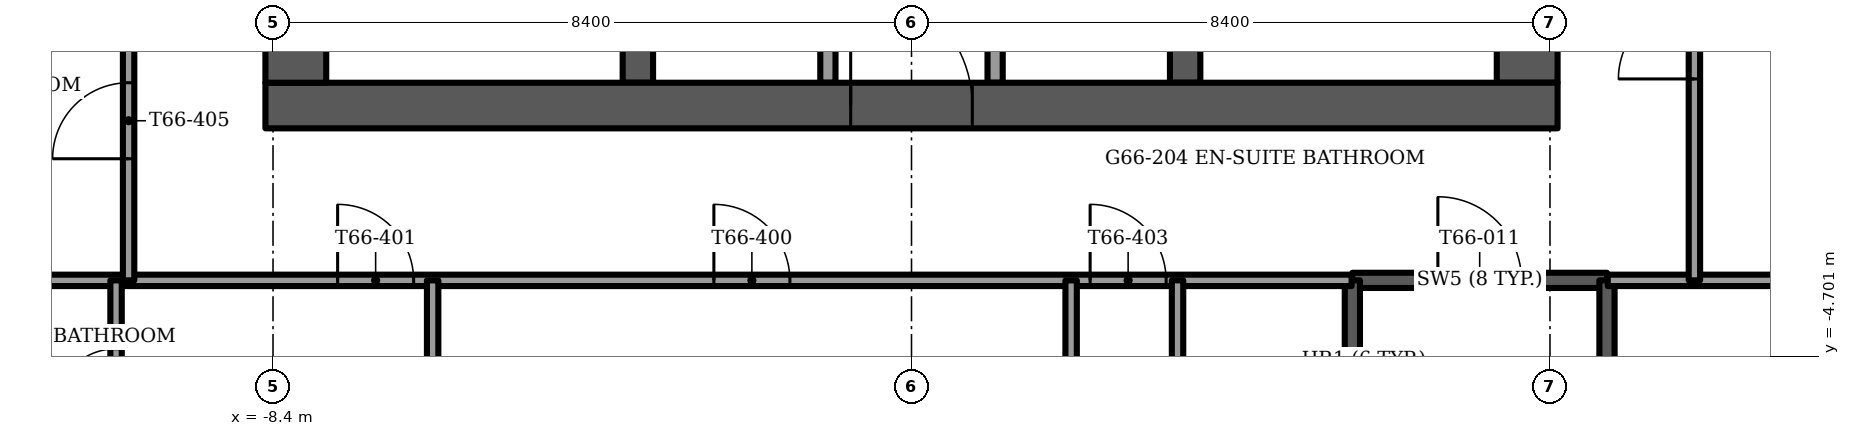
"""IFC4 building model, lengths in metres.
Left out: names, types, materials, properties, quantities, classifications, styles, units other than length and angle.
Written with IfcOpenShell. Run it as: python <this file> out.ifc"""

import sys

from ifc_helpers import new_model, si_unit, direction, frame, frame_2d, origin, place, context, subcontext, project, spatial, rectangle, extrude, element, fill, save


model = new_model("IFC4")
c1 = context("Model", 3, precision=1e-05, world=origin(), true_north=direction((0.0, 1.0)))
c2 = subcontext(c1, "Body", "Model", "MODEL_VIEW")
j1 = project(units=[si_unit("LENGTHUNIT", "METRE"), si_unit("PLANEANGLEUNIT", "RADIAN")], contexts=[c1])
p1 = place(None, origin())
s1 = spatial("IfcSite", under=j1, at=p1, CompositionType="ELEMENT")
p2 = place(p1, origin())
s2 = spatial("IfcBuilding", under=s1, at=p2, CompositionType="ELEMENT")
p3 = place(p2, frame((0.0, 0.0, 267.5)))
s3 = spatial("IfcBuildingStorey", under=s2, at=p3, CompositionType="ELEMENT", Elevation=267.5)
p4 = place(p3, frame((-8.5, -1.4, -0.3), z_axis=(0.0, 0.0, 1.0), x_axis=(1.0, 0.0, 0.0)))
e1 = element("IfcWall", 1, at=p4, inside=s3, PredefinedType="SHEAR", context=c2, shape_type="SweptSolid", body=[
    extrude(rectangle(XDim=17.0, YDim=0.6, at=frame_2d((8.5, 0.0))), origin(), (0.0, 0.0, 1.0), 3.75),
])
p5 = place(p4, frame((7.7, 0.0, 0.0)))
e2 = element("IfcOpeningElement", 2, at=p5, cuts=e1, PredefinedType="OPENING", context=c2, shape_type="SweptSolid", body=[
    extrude(rectangle(XDim=1.6, YDim=2.1, at=frame_2d((0.8, 1.05))), frame((0.0, 0.3, 0.0), z_axis=(0.0, -1.0, 0.0), x_axis=(1.0, 0.0, 0.0)), (0.0, 0.0, 1.0), 0.6),
])
p6 = place(p3, frame((-8.1, -1.1, -0.3), z_axis=(0.0, 0.0, 1.0), x_axis=(0.0, 1.0, 0.0)))
e3 = element("IfcWall", 3, at=p6, inside=s3, PredefinedType="SHEAR", context=c2, shape_type="SweptSolid", body=[
    extrude(rectangle(XDim=10.2, YDim=0.8, at=frame_2d((5.1, 0.0))), origin(), (0.0, 0.0, 1.0), 3.75),
])
p7 = place(p6, frame((8.35, 0.0, 0.0)))
e4 = element("IfcOpeningElement", 4, at=p7, cuts=e3, PredefinedType="OPENING", context=c2, shape_type="SweptSolid", body=[
    extrude(rectangle(XDim=1.1, YDim=2.1, at=frame_2d((0.55, 1.05))), frame((0.0, 0.4, 0.0), z_axis=(0.0, -1.0, 0.0), x_axis=(1.0, 0.0, 0.0)), (0.0, 0.0, 1.0), 0.8),
])
p8 = place(p3, frame((8.1, -1.1, -0.3), z_axis=(0.0, 0.0, 1.0), x_axis=(0.0, 1.0, 0.0)))
e5 = element("IfcWall", 5, at=p8, inside=s3, PredefinedType="SHEAR", context=c2, shape_type="SweptSolid", body=[
    extrude(rectangle(XDim=10.2, YDim=0.8, at=frame_2d((5.1, 0.0))), origin(), (0.0, 0.0, 1.0), 3.75),
])
p9 = place(p8, frame((8.35, 0.0, 0.0)))
e6 = element("IfcOpeningElement", 6, at=p9, cuts=e5, PredefinedType="OPENING", context=c2, shape_type="SweptSolid", body=[
    extrude(rectangle(XDim=1.1, YDim=2.1, at=frame_2d((0.55, 1.05))), frame((0.0, 0.4, 0.0), z_axis=(0.0, -1.0, 0.0), x_axis=(1.0, 0.0, 0.0)), (0.0, 0.0, 1.0), 0.8),
])
for number, where, z_axis, x_axis in (
    (7, (-3.6, -1.1, -0.3), (0.0, 0.0, 1.0), (0.0, 1.0, 0.0)),
    (8, (3.6, -1.1, -0.3), (0.0, 0.0, 1.0), (0.0, 1.0, 0.0)),
):
    element("IfcWall", number, at=place(p3, frame(where, z_axis=z_axis, x_axis=x_axis)), inside=s3, PredefinedType="SHEAR", context=c2, shape_type="SweptSolid", body=[
        extrude(rectangle(XDim=10.2, YDim=0.4, at=frame_2d((5.1, 0.0))), origin(), (0.0, 0.0, 1.0), 3.75),
    ])
p10 = place(p3, frame((-15.104, -1.689, 0.0), z_axis=(0.0, 0.0, 1.0), x_axis=(0.499998361514, -0.866026349763, 0.0)))
e9 = element("IfcWall", 9, at=p10, inside=s3, PredefinedType="SOLIDWALL", context=c2, shape_type="SweptSolid", body=[
    extrude(rectangle(XDim=12.179, YDim=0.15, at=frame_2d((6.089, 0.0))), origin(), (0.0, 0.0, 1.0), 3.45),
])
p11 = place(p10, frame((3.548, 0.0, 0.15)))
e10 = element("IfcOpeningElement", 10, at=p11, cuts=e9, PredefinedType="OPENING", context=c2, shape_type="SweptSolid", body=[
    extrude(rectangle(XDim=1.4, YDim=2.85, at=frame_2d((0.7, 1.425))), frame((0.0, 0.075, 0.0), z_axis=(0.0, -1.0, 0.0), x_axis=(1.0, 0.0, 0.0)), (0.0, 0.0, 1.0), 0.15),
])
p12 = place(p10, frame((6.389, 0.0, 0.15)))
e11 = element("IfcOpeningElement", 11, at=p12, cuts=e9, PredefinedType="OPENING", context=c2, shape_type="SweptSolid", body=[
    extrude(rectangle(XDim=1.5, YDim=2.85, at=frame_2d((0.75, 1.425))), frame((0.0, 0.075, 0.0), z_axis=(0.0, -1.0, 0.0), x_axis=(1.0, 0.0, 0.0)), (0.0, 0.0, 1.0), 0.15),
])
p13 = place(p10, frame((8.589, 0.0, 0.0)))
e12 = element("IfcOpeningElement", 12, at=p13, cuts=e9, PredefinedType="OPENING", context=c2, shape_type="SweptSolid", body=[
    extrude(rectangle(XDim=1.4, YDim=2.4, at=frame_2d((0.7, 1.2))), frame((0.0, 0.075, 0.0), z_axis=(0.0, -1.0, 0.0), x_axis=(1.0, 0.0, 0.0)), (0.0, 0.0, 1.0), 0.15),
])
p14 = place(p10, frame((0.445, 0.0, 0.15)))
e13 = element("IfcOpeningElement", 13, at=p14, cuts=e9, PredefinedType="OPENING", context=c2, shape_type="SweptSolid", body=[
    extrude(rectangle(XDim=0.9, YDim=2.73, at=frame_2d((0.45, 1.365))), frame((0.0, 0.075, 0.0), z_axis=(0.0, -1.0, 0.0), x_axis=(1.0, 0.0, 0.0)), (0.0, 0.0, 1.0), 0.15),
])
p15 = place(p3, frame((9.015, -12.236, 0.0), z_axis=(0.0, 0.0, 1.0), x_axis=(0.499998361514, 0.866026349763, 0.0)))
e14 = element("IfcWall", 14, at=p15, inside=s3, PredefinedType="SOLIDWALL", context=c2, shape_type="SweptSolid", body=[
    extrude(rectangle(XDim=12.179, YDim=0.15, at=frame_2d((6.089, 0.0))), origin(), (0.0, 0.0, 1.0), 3.45),
])
p16 = place(p15, frame((2.189, 0.0, 0.15)))
e15 = element("IfcOpeningElement", 15, at=p16, cuts=e14, PredefinedType="OPENING", context=c2, shape_type="SweptSolid", body=[
    extrude(rectangle(XDim=1.5, YDim=2.85, at=frame_2d((0.75, 1.425))), frame((0.0, 0.075, 0.0), z_axis=(0.0, -1.0, 0.0), x_axis=(1.0, 0.0, 0.0)), (0.0, 0.0, 1.0), 0.15),
])
p17 = place(p15, frame((4.389, 0.0, 0.0)))
e16 = element("IfcOpeningElement", 16, at=p17, cuts=e14, PredefinedType="OPENING", context=c2, shape_type="SweptSolid", body=[
    extrude(rectangle(XDim=1.4, YDim=2.4, at=frame_2d((0.7, 1.2))), frame((0.0, 0.075, 0.0), z_axis=(0.0, -1.0, 0.0), x_axis=(1.0, 0.0, 0.0)), (0.0, 0.0, 1.0), 0.15),
])
p18 = place(p15, frame((6.389, 0.0, 0.15)))
e17 = element("IfcOpeningElement", 17, at=p18, cuts=e14, PredefinedType="OPENING", context=c2, shape_type="SweptSolid", body=[
    extrude(rectangle(XDim=0.9, YDim=2.85, at=frame_2d((0.45, 1.425))), frame((0.0, 0.075, 0.0), z_axis=(0.0, -1.0, 0.0), x_axis=(1.0, 0.0, 0.0)), (0.0, 0.0, 1.0), 0.15),
])
p19 = place(p15, frame((7.583, 0.0, 0.0)))
e18 = element("IfcOpeningElement", 18, at=p19, cuts=e14, PredefinedType="OPENING", context=c2, shape_type="SweptSolid", body=[
    extrude(rectangle(XDim=1.4, YDim=2.4, at=frame_2d((0.7, 1.2))), frame((0.0, 0.075, 0.0), z_axis=(0.0, -1.0, 0.0), x_axis=(1.0, 0.0, 0.0)), (0.0, 0.0, 1.0), 0.15),
])
p20 = place(p15, frame((10.834, 0.0, 0.15)))
e19 = element("IfcOpeningElement", 19, at=p20, cuts=e14, PredefinedType="OPENING", context=c2, shape_type="SweptSolid", body=[
    extrude(rectangle(XDim=0.9, YDim=2.73, at=frame_2d((0.45, 1.365))), frame((0.0, 0.075, 0.0), z_axis=(0.0, -1.0, 0.0), x_axis=(1.0, 0.0, 0.0)), (0.0, 0.0, 1.0), 0.15),
])
for number, where, z_axis, x_axis in (
    (20, (-1.1, -1.1, 0.0), (0.0, 0.0, 1.0), (0.0, 1.0, 0.0)),
    (21, (1.1, -1.1, 0.0), (0.0, 0.0, 1.0), (0.0, 1.0, 0.0)),
):
    element("IfcWall", number, at=place(p3, frame(where, z_axis=z_axis, x_axis=x_axis)), inside=s3, PredefinedType="PARTITIONING", context=c2, shape_type="SweptSolid", body=[
        extrude(rectangle(XDim=2.9, YDim=0.2, at=frame_2d((1.45, 0.0))), origin(), (0.0, 0.0, 1.0), 3.45),
    ])
p21 = place(p3, frame((5.8, -3.7, -0.3), z_axis=(0.0, 0.0, 1.0), x_axis=(1.0, 0.0, 0.0)))
e22 = element("IfcWall", 22, at=p21, inside=s3, PredefinedType="SOLIDWALL", context=c2, shape_type="SweptSolid", body=[
    extrude(rectangle(XDim=3.35, YDim=0.2, at=frame_2d((1.675, 0.0))), origin(), (0.0, 0.0, 1.0), 3.75),
])
p22 = place(p21, frame((1.125, 0.0, 0.0)))
e23 = element("IfcOpeningElement", 23, at=p22, cuts=e22, PredefinedType="OPENING", context=c2, shape_type="SweptSolid", body=[
    extrude(rectangle(XDim=1.1, YDim=2.1, at=frame_2d((0.55, 1.05))), frame((0.0, 0.1, 0.0), z_axis=(0.0, -1.0, 0.0), x_axis=(1.0, 0.0, 0.0)), (0.0, 0.0, 1.0), 0.2),
])
for number, where, z_axis, x_axis in (
    (24, (5.8, -3.7, -0.3), (0.0, 0.0, 1.0), (0.0, -1.0, 0.0)),
    (25, (9.15, -3.7, -0.3), (0.0, 0.0, 1.0), (0.0, -1.0, 0.0)),
):
    element("IfcWall", number, at=place(p3, frame(where, z_axis=z_axis, x_axis=x_axis)), inside=s3, PredefinedType="SOLIDWALL", context=c2, shape_type="SweptSolid", body=[
        extrude(rectangle(XDim=7.7, YDim=0.2, at=frame_2d((3.85, 0.0))), origin(), (0.0, 0.0, 1.0), 3.75),
    ])
p23 = place(p3, frame((-13.995, -3.7, 0.0), z_axis=(0.0, 0.0, 1.0), x_axis=(1.0, 0.0, 0.0)))
e26 = element("IfcWall", 26, at=p23, inside=s3, PredefinedType="PARTITIONING", context=c2, shape_type="SweptSolid", body=[
    extrude(rectangle(XDim=19.785, YDim=0.15, at=frame_2d((9.893, 0.0))), origin(), (0.0, 0.0, 1.0), 3.45),
])
p24 = place(p23, frame((11.395, 0.0, 0.0)))
e27 = element("IfcOpeningElement", 27, at=p24, cuts=e26, PredefinedType="OPENING", context=c2, shape_type="SweptSolid", body=[
    extrude(rectangle(XDim=1.0, YDim=2.1, at=frame_2d((0.5, 1.05))), frame((0.0, 0.075, 0.0), z_axis=(0.0, -1.0, 0.0), x_axis=(1.0, 0.0, 0.0)), (0.0, 0.0, 1.0), 0.15),
])
p25 = place(p23, frame((6.445, 0.0, 0.0)))
e28 = element("IfcOpeningElement", 28, at=p25, cuts=e26, PredefinedType="OPENING", context=c2, shape_type="SweptSolid", body=[
    extrude(rectangle(XDim=1.0, YDim=2.1, at=frame_2d((0.5, 1.05))), frame((0.0, 0.075, 0.0), z_axis=(0.0, -1.0, 0.0), x_axis=(1.0, 0.0, 0.0)), (0.0, 0.0, 1.0), 0.15),
])
p26 = place(p23, frame((16.345, 0.0, 0.0)))
e29 = element("IfcOpeningElement", 29, at=p26, cuts=e26, PredefinedType="OPENING", context=c2, shape_type="SweptSolid", body=[
    extrude(rectangle(XDim=1.0, YDim=2.1, at=frame_2d((0.5, 1.05))), frame((0.0, 0.075, 0.0), z_axis=(0.0, -1.0, 0.0), x_axis=(1.0, 0.0, 0.0)), (0.0, 0.0, 1.0), 0.15),
])
p27 = place(p3, frame((9.16, -3.7, 0.0), z_axis=(0.0, 0.0, 1.0), x_axis=(1.0, 0.0, 0.0)))
e30 = element("IfcWall", 30, at=p27, inside=s3, PredefinedType="PARTITIONING", context=c2, shape_type="SweptSolid", body=[
    extrude(rectangle(XDim=4.835, YDim=0.15, at=frame_2d((2.417, 0.0))), origin(), (0.0, 0.0, 1.0), 3.45),
])
p28 = place(p3, frame((10.3, -3.7, 0.0), z_axis=(0.0, 0.0, 1.0), x_axis=(0.0, 1.0, 0.0)))
e31 = element("IfcWall", 31, at=p28, inside=s3, PredefinedType="PARTITIONING", context=c2, shape_type="SweptSolid", body=[
    extrude(rectangle(XDim=11.487, YDim=0.15, at=frame_2d((5.744, 0.0))), origin(), (0.0, 0.0, 1.0), 3.45),
])
p29 = place(p28, frame((2.65, 0.0, 0.0)))
e32 = element("IfcOpeningElement", 32, at=p29, cuts=e31, PredefinedType="OPENING", context=c2, shape_type="SweptSolid", body=[
    extrude(rectangle(XDim=1.0, YDim=2.1, at=frame_2d((0.5, 1.05))), frame((0.0, 0.075, 0.0), z_axis=(0.0, -1.0, 0.0), x_axis=(1.0, 0.0, 0.0)), (0.0, 0.0, 1.0), 0.15),
])
p30 = place(p28, frame((8.273, 0.0, 0.0)))
e33 = element("IfcOpeningElement", 33, at=p30, cuts=e31, PredefinedType="OPENING", context=c2, shape_type="SweptSolid", body=[
    extrude(rectangle(XDim=1.0, YDim=2.1, at=frame_2d((0.5, 1.05))), frame((0.0, 0.075, 0.0), z_axis=(0.0, -1.0, 0.0), x_axis=(1.0, 0.0, 0.0)), (0.0, 0.0, 1.0), 0.15),
])
p31 = place(p3, frame((3.5, -7.3, 0.0), z_axis=(0.0, 0.0, 1.0), x_axis=(0.0, 1.0, 0.0)))
e34 = element("IfcWall", 34, at=p31, inside=s3, PredefinedType="PARTITIONING", context=c2, shape_type="SweptSolid", body=[
    extrude(rectangle(XDim=3.6, YDim=0.15, at=frame_2d((1.8, 0.0))), origin(), (0.0, 0.0, 1.0), 3.45),
])
p32 = place(p31, frame((1.4, 0.0, 0.0)))
e35 = element("IfcOpeningElement", 35, at=p32, cuts=e34, PredefinedType="OPENING", context=c2, shape_type="SweptSolid", body=[
    extrude(rectangle(XDim=0.8, YDim=2.1, at=frame_2d((0.4, 1.05))), frame((0.0, 0.075, 0.0), z_axis=(0.0, -1.0, 0.0), x_axis=(1.0, 0.0, 0.0)), (0.0, 0.0, 1.0), 0.15),
])
for number, where, z_axis, x_axis in (
    (36, (2.1, -12.814, 0.0), (0.0, 0.0, 1.0), (0.0, 1.0, 0.0)),
    (37, (-6.3, -12.814, 0.0), (0.0, 0.0, 1.0), (0.0, 1.0, 0.0)),
):
    element("IfcWall", number, at=place(p3, frame(where, z_axis=z_axis, x_axis=x_axis)), inside=s3, PredefinedType="PARTITIONING", context=c2, shape_type="SweptSolid", body=[
        extrude(rectangle(XDim=9.114, YDim=0.15, at=frame_2d((4.557, 0.0))), origin(), (0.0, 0.0, 1.0), 3.45),
    ])
p33 = place(p3, frame((-10.3, -3.7, 0.0), z_axis=(0.0, 0.0, 1.0), x_axis=(0.0, 1.0, 0.0)))
e38 = element("IfcWall", 38, at=p33, inside=s3, PredefinedType="PARTITIONING", context=c2, shape_type="SweptSolid", body=[
    extrude(rectangle(XDim=11.487, YDim=0.15, at=frame_2d((5.744, 0.0))), origin(), (0.0, 0.0, 1.0), 3.45),
])
p34 = place(p33, frame((1.6, 0.0, 0.0)))
e39 = element("IfcOpeningElement", 39, at=p34, cuts=e38, PredefinedType="OPENING", context=c2, shape_type="SweptSolid", body=[
    extrude(rectangle(XDim=1.0, YDim=2.1, at=frame_2d((0.5, 1.05))), frame((0.0, 0.075, 0.0), z_axis=(0.0, -1.0, 0.0), x_axis=(1.0, 0.0, 0.0)), (0.0, 0.0, 1.0), 0.15),
])
p35 = place(p33, frame((7.222, 0.0, 0.0)))
e40 = element("IfcOpeningElement", 40, at=p35, cuts=e38, PredefinedType="OPENING", context=c2, shape_type="SweptSolid", body=[
    extrude(rectangle(XDim=1.0, YDim=2.1, at=frame_2d((0.5, 1.05))), frame((0.0, 0.075, 0.0), z_axis=(0.0, -1.0, 0.0), x_axis=(1.0, 0.0, 0.0)), (0.0, 0.0, 1.0), 0.15),
])
p36 = place(p3, frame((-10.465, -6.3, 0.0), z_axis=(0.0, 0.0, 1.0), x_axis=(0.0, 1.0, 0.0)))
e41 = element("IfcWall", 41, at=p36, inside=s3, PredefinedType="PARTITIONING", context=c2, shape_type="SweptSolid", body=[
    extrude(rectangle(XDim=2.6, YDim=0.15, at=frame_2d((1.3, 0.0))), origin(), (0.0, 0.0, 1.0), 3.45),
])
p37 = place(p36, frame((0.9, 0.0, 0.0)))
e42 = element("IfcOpeningElement", 42, at=p37, cuts=e41, PredefinedType="OPENING", context=c2, shape_type="SweptSolid", body=[
    extrude(rectangle(XDim=0.8, YDim=2.1, at=frame_2d((0.4, 1.05))), frame((0.0, 0.075, 0.0), z_axis=(0.0, -1.0, 0.0), x_axis=(1.0, 0.0, 0.0)), (0.0, 0.0, 1.0), 0.15),
])
p38 = place(p5, origin())
e43 = element("IfcDoor", 43, at=p38, inside=s3, OperationType="DOUBLE_DOOR_SINGLE_SWING", PredefinedType="DOOR", context=c2, shape_type="SweptSolid", body=[
    extrude(rectangle(XDim=1.6, YDim=2.1, at=frame_2d((0.8, 1.05))), frame((0.0, 0.025, 0.0), z_axis=(0.0, -1.0, 0.0), x_axis=(1.0, 0.0, 0.0)), (0.0, 0.0, 1.0), 0.05),
])
fill(e2, e43)
p39 = place(p22, origin())
e44 = element("IfcDoor", 44, at=p39, inside=s3, OperationType="SINGLE_SWING_LEFT", PredefinedType="DOOR", context=c2, shape_type="SweptSolid", body=[
    extrude(rectangle(XDim=1.1, YDim=2.1, at=frame_2d((0.55, 1.05))), frame((0.0, 0.025, 0.0), z_axis=(0.0, -1.0, 0.0), x_axis=(1.0, 0.0, 0.0)), (0.0, 0.0, 1.0), 0.05),
])
fill(e23, e44)
p40 = place(p24, origin())
e45 = element("IfcDoor", 45, at=p40, inside=s3, OperationType="SINGLE_SWING_LEFT", PredefinedType="DOOR", context=c2, shape_type="SweptSolid", body=[
    extrude(rectangle(XDim=1.0, YDim=2.1, at=frame_2d((0.5, 1.05))), frame((0.0, 0.025, 0.0), z_axis=(0.0, -1.0, 0.0), x_axis=(1.0, 0.0, 0.0)), (0.0, 0.0, 1.0), 0.05),
])
fill(e27, e45)
p41 = place(p25, origin())
e46 = element("IfcDoor", 46, at=p41, inside=s3, OperationType="SINGLE_SWING_RIGHT", PredefinedType="DOOR", context=c2, shape_type="SweptSolid", body=[
    extrude(rectangle(XDim=1.0, YDim=2.1, at=frame_2d((0.5, 1.05))), frame((0.0, 0.025, 0.0), z_axis=(0.0, -1.0, 0.0), x_axis=(1.0, 0.0, 0.0)), (0.0, 0.0, 1.0), 0.05),
])
fill(e28, e46)
p42 = place(p37, origin())
e47 = element("IfcDoor", 47, at=p42, inside=s3, OperationType="SINGLE_SWING_RIGHT", PredefinedType="DOOR", context=c2, shape_type="SweptSolid", body=[
    extrude(rectangle(XDim=0.8, YDim=2.1, at=frame_2d((0.4, 1.05))), frame((0.0, 0.025, 0.0), z_axis=(0.0, -1.0, 0.0), x_axis=(1.0, 0.0, 0.0)), (0.0, 0.0, 1.0), 0.05),
])
fill(e42, e47)
p43 = place(p26, origin())
e48 = element("IfcDoor", 48, at=p43, inside=s3, OperationType="SINGLE_SWING_LEFT", PredefinedType="DOOR", context=c2, shape_type="SweptSolid", body=[
    extrude(rectangle(XDim=1.0, YDim=2.1, at=frame_2d((0.5, 1.05))), frame((0.0, 0.025, 0.0), z_axis=(0.0, -1.0, 0.0), x_axis=(1.0, 0.0, 0.0)), (0.0, 0.0, 1.0), 0.05),
])
fill(e29, e48)
p44 = place(p34, origin())
e49 = element("IfcDoor", 49, at=p44, inside=s3, OperationType="SINGLE_SWING_RIGHT", PredefinedType="DOOR", context=c2, shape_type="SweptSolid", body=[
    extrude(rectangle(XDim=1.0, YDim=2.1, at=frame_2d((0.5, 1.05))), frame((0.0, 0.025, 0.0), z_axis=(0.0, -1.0, 0.0), x_axis=(1.0, 0.0, 0.0)), (0.0, 0.0, 1.0), 0.05),
])
fill(e39, e49)
p45 = place(p29, origin())
e50 = element("IfcDoor", 50, at=p45, inside=s3, OperationType="SINGLE_SWING_LEFT", PredefinedType="DOOR", context=c2, shape_type="SweptSolid", body=[
    extrude(rectangle(XDim=1.0, YDim=2.1, at=frame_2d((0.5, 1.05))), frame((0.0, 0.025, 0.0), z_axis=(0.0, -1.0, 0.0), x_axis=(1.0, 0.0, 0.0)), (0.0, 0.0, 1.0), 0.05),
])
fill(e32, e50)
save(model, sys.argv[1])
